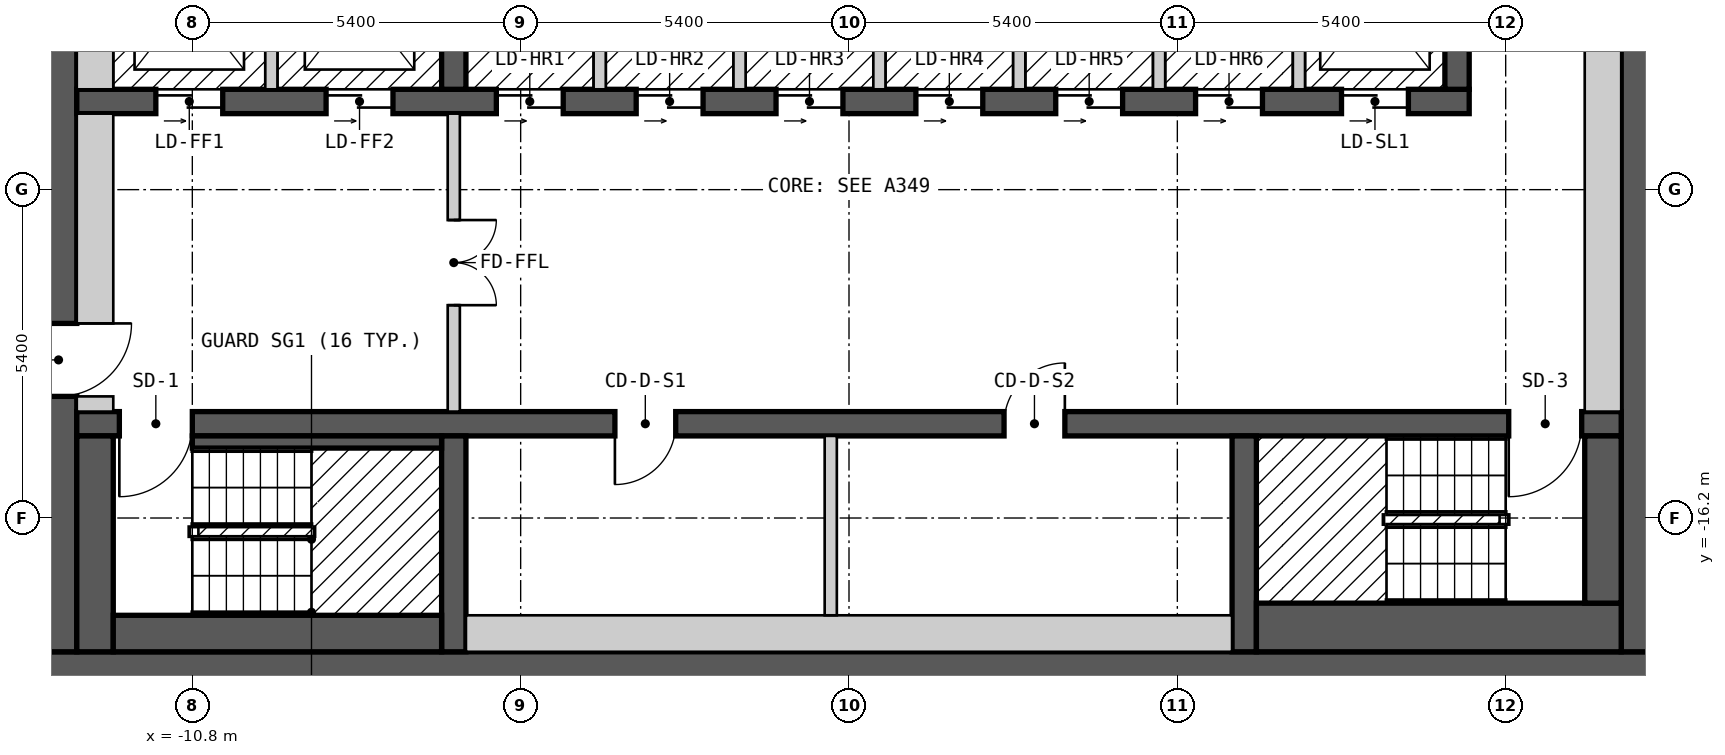
"""IFC4 building model, lengths in metres.
Left out: names, types, materials, properties, quantities, classifications, styles, units other than length and angle.
Written with IfcOpenShell. Run it as: python <this file> out.ifc"""

import sys

from ifc_helpers import new_model, si_unit, direction, frame, frame_2d, origin, place, context, subcontext, project, spatial, rectangle, extrude, element, fill, save


model = new_model("IFC4")
c1 = context("Model", 3, precision=1e-05, world=origin(), true_north=direction((0.0, 1.0)))
c2 = subcontext(c1, "Body", "Model", "MODEL_VIEW")
j1 = project(units=[si_unit("LENGTHUNIT", "METRE"), si_unit("PLANEANGLEUNIT", "RADIAN")], contexts=[c1])
p1 = place(None, origin())
s1 = spatial("IfcSite", under=j1, at=p1, CompositionType="ELEMENT")
p2 = place(p1, origin())
s2 = spatial("IfcBuilding", under=s1, at=p2, CompositionType="ELEMENT")
p3 = place(p2, frame((0.0, 0.0, 181.2)))
s3 = spatial("IfcBuildingStorey", under=s2, at=p3, CompositionType="ELEMENT", Elevation=181.2)
p4 = place(p3, frame((-13.3, -18.7, 0.0), z_axis=(0.0, 0.0, 1.0), x_axis=(1.0, 0.0, 0.0)))
e1 = element("IfcWall", 1, at=p4, inside=s3, PredefinedType="SHEAR", context=c2, shape_type="SweptSolid", body=[
    extrude(rectangle(XDim=26.6, YDim=0.6, at=frame_2d((13.3, 0.0))), origin(), (0.0, 0.0, 1.0), 2.7),
])
p5 = place(p3, frame((-13.0, -18.4, 0.0), z_axis=(0.0, 0.0, 1.0), x_axis=(0.0, 1.0, 0.0)))
e2 = element("IfcWall", 2, at=p5, inside=s3, PredefinedType="SHEAR", context=c2, shape_type="SweptSolid", body=[
    extrude(rectangle(XDim=12.8, YDim=0.6, at=frame_2d((6.4, 0.0))), origin(), (0.0, 0.0, 1.0), 2.7),
])
p6 = place(p5, frame((4.2, 0.0, 0.0)))
e3 = element("IfcOpeningElement", 3, at=p6, cuts=e2, PredefinedType="OPENING", context=c2, shape_type="SweptSolid", body=[
    extrude(rectangle(XDim=1.2, YDim=2.1, at=frame_2d((0.6, 1.05))), frame((0.0, 0.31, 0.0), z_axis=(0.0, -1.0, 0.0), x_axis=(1.0, 0.0, 0.0)), (0.0, 0.0, 1.0), 0.62),
])
p7 = place(p3, frame((13.0, -18.4, 0.0), z_axis=(0.0, 0.0, 1.0), x_axis=(0.0, 1.0, 0.0)))
e4 = element("IfcWall", 4, at=p7, inside=s3, PredefinedType="SHEAR", context=c2, shape_type="SweptSolid", body=[
    extrude(rectangle(XDim=12.8, YDim=0.6, at=frame_2d((6.4, 0.0))), origin(), (0.0, 0.0, 1.0), 2.7),
])
p8 = place(p3, frame((-12.7, -14.65, 0.0), z_axis=(0.0, 0.0, 1.0), x_axis=(1.0, 0.0, 0.0)))
e5 = element("IfcWall", 5, at=p8, inside=s3, PredefinedType="SHEAR", context=c2, shape_type="SweptSolid", body=[
    extrude(rectangle(XDim=25.4, YDim=0.4, at=frame_2d((12.7, 0.0))), origin(), (0.0, 0.0, 1.0), 2.7),
])
p9 = place(p8, frame((1.9, 0.0, 0.0), z_axis=(0.0, 0.0, 1.0), x_axis=(-1.0, 0.0, 0.0)))
e6 = element("IfcOpeningElement", 6, at=p9, cuts=e5, PredefinedType="OPENING", context=c2, shape_type="SweptSolid", body=[
    extrude(rectangle(XDim=1.2, YDim=2.1, at=frame_2d((0.6, 1.05))), frame((0.0, 0.21, 0.0), z_axis=(0.0, -1.0, 0.0), x_axis=(1.0, 0.0, 0.0)), (0.0, 0.0, 1.0), 0.42),
])
p10 = place(p8, frame((24.75, 0.0, 0.0), z_axis=(0.0, 0.0, 1.0), x_axis=(-1.0, 0.0, 0.0)))
e7 = element("IfcOpeningElement", 7, at=p10, cuts=e5, PredefinedType="OPENING", context=c2, shape_type="SweptSolid", body=[
    extrude(rectangle(XDim=1.2, YDim=2.1, at=frame_2d((0.6, 1.05))), frame((0.0, 0.21, 0.0), z_axis=(0.0, -1.0, 0.0), x_axis=(1.0, 0.0, 0.0)), (0.0, 0.0, 1.0), 0.42),
])
p11 = place(p8, frame((9.85, 0.0, 0.0), z_axis=(0.0, 0.0, 1.0), x_axis=(-1.0, 0.0, 0.0)))
e8 = element("IfcOpeningElement", 8, at=p11, cuts=e5, PredefinedType="OPENING", context=c2, shape_type="SweptSolid", body=[
    extrude(rectangle(XDim=1.0, YDim=2.1, at=frame_2d((0.5, 1.05))), frame((0.0, 0.21, 0.0), z_axis=(0.0, -1.0, 0.0), x_axis=(1.0, 0.0, 0.0)), (0.0, 0.0, 1.0), 0.42),
])
p12 = place(p8, frame((16.25, 0.0, 0.0), z_axis=(0.0, 0.0, 1.0), x_axis=(-1.0, 0.0, 0.0)))
e9 = element("IfcOpeningElement", 9, at=p12, cuts=e5, PredefinedType="OPENING", context=c2, shape_type="SweptSolid", body=[
    extrude(rectangle(XDim=1.0, YDim=2.1, at=frame_2d((0.5, 1.05))), frame((0.0, 0.21, 0.0), z_axis=(0.0, -1.0, 0.0), x_axis=(1.0, 0.0, 0.0)), (0.0, 0.0, 1.0), 0.42),
])
p13 = place(p3, frame((-12.7, -9.35, 0.0), z_axis=(0.0, 0.0, 1.0), x_axis=(1.0, 0.0, 0.0)))
e10 = element("IfcWall", 10, at=p13, inside=s3, PredefinedType="SHEAR", context=c2, shape_type="SweptSolid", body=[
    extrude(rectangle(XDim=22.9, YDim=0.4, at=frame_2d((11.45, 0.0))), origin(), (0.0, 0.0, 1.0), 2.7),
])
p14 = place(p13, frame((1.3, 0.0, 0.0)))
e11 = element("IfcOpeningElement", 11, at=p14, cuts=e10, PredefinedType="OPENING", context=c2, shape_type="SweptSolid", body=[
    extrude(rectangle(XDim=1.1, YDim=2.1, at=frame_2d((0.55, 1.05))), frame((0.0, 0.21, 0.0), z_axis=(0.0, -1.0, 0.0), x_axis=(1.0, 0.0, 0.0)), (0.0, 0.0, 1.0), 0.42),
])
p15 = place(p13, frame((4.1, 0.0, 0.0)))
e12 = element("IfcOpeningElement", 12, at=p15, cuts=e10, PredefinedType="OPENING", context=c2, shape_type="SweptSolid", body=[
    extrude(rectangle(XDim=1.1, YDim=2.1, at=frame_2d((0.55, 1.05))), frame((0.0, 0.21, 0.0), z_axis=(0.0, -1.0, 0.0), x_axis=(1.0, 0.0, 0.0)), (0.0, 0.0, 1.0), 0.42),
])
p16 = place(p13, frame((6.9, 0.0, 0.0)))
e13 = element("IfcOpeningElement", 13, at=p16, cuts=e10, PredefinedType="OPENING", context=c2, shape_type="SweptSolid", body=[
    extrude(rectangle(XDim=1.1, YDim=2.1, at=frame_2d((0.55, 1.05))), frame((0.0, 0.21, 0.0), z_axis=(0.0, -1.0, 0.0), x_axis=(1.0, 0.0, 0.0)), (0.0, 0.0, 1.0), 0.42),
])
p17 = place(p13, frame((9.2, 0.0, 0.0)))
e14 = element("IfcOpeningElement", 14, at=p17, cuts=e10, PredefinedType="OPENING", context=c2, shape_type="SweptSolid", body=[
    extrude(rectangle(XDim=1.1, YDim=2.1, at=frame_2d((0.55, 1.05))), frame((0.0, 0.21, 0.0), z_axis=(0.0, -1.0, 0.0), x_axis=(1.0, 0.0, 0.0)), (0.0, 0.0, 1.0), 0.42),
])
p18 = place(p13, frame((11.5, 0.0, 0.0)))
e15 = element("IfcOpeningElement", 15, at=p18, cuts=e10, PredefinedType="OPENING", context=c2, shape_type="SweptSolid", body=[
    extrude(rectangle(XDim=1.1, YDim=2.1, at=frame_2d((0.55, 1.05))), frame((0.0, 0.21, 0.0), z_axis=(0.0, -1.0, 0.0), x_axis=(1.0, 0.0, 0.0)), (0.0, 0.0, 1.0), 0.42),
])
p19 = place(p13, frame((13.8, 0.0, 0.0)))
e16 = element("IfcOpeningElement", 16, at=p19, cuts=e10, PredefinedType="OPENING", context=c2, shape_type="SweptSolid", body=[
    extrude(rectangle(XDim=1.1, YDim=2.1, at=frame_2d((0.55, 1.05))), frame((0.0, 0.21, 0.0), z_axis=(0.0, -1.0, 0.0), x_axis=(1.0, 0.0, 0.0)), (0.0, 0.0, 1.0), 0.42),
])
p20 = place(p13, frame((16.1, 0.0, 0.0)))
e17 = element("IfcOpeningElement", 17, at=p20, cuts=e10, PredefinedType="OPENING", context=c2, shape_type="SweptSolid", body=[
    extrude(rectangle(XDim=1.1, YDim=2.1, at=frame_2d((0.55, 1.05))), frame((0.0, 0.21, 0.0), z_axis=(0.0, -1.0, 0.0), x_axis=(1.0, 0.0, 0.0)), (0.0, 0.0, 1.0), 0.42),
])
p21 = place(p13, frame((18.4, 0.0, 0.0)))
e18 = element("IfcOpeningElement", 18, at=p21, cuts=e10, PredefinedType="OPENING", context=c2, shape_type="SweptSolid", body=[
    extrude(rectangle(XDim=1.1, YDim=2.1, at=frame_2d((0.55, 1.05))), frame((0.0, 0.21, 0.0), z_axis=(0.0, -1.0, 0.0), x_axis=(1.0, 0.0, 0.0)), (0.0, 0.0, 1.0), 0.42),
])
p22 = place(p13, frame((20.8, 0.0, 0.0)))
e19 = element("IfcOpeningElement", 19, at=p22, cuts=e10, PredefinedType="OPENING", context=c2, shape_type="SweptSolid", body=[
    extrude(rectangle(XDim=1.1, YDim=2.1, at=frame_2d((0.55, 1.05))), frame((0.0, 0.21, 0.0), z_axis=(0.0, -1.0, 0.0), x_axis=(1.0, 0.0, 0.0)), (0.0, 0.0, 1.0), 0.42),
])
for number, where, z_axis, x_axis in (
    (20, (-6.5, -18.4, 0.0), (0.0, 0.0, 1.0), (0.0, 1.0, 0.0)),
    (21, (6.5, -18.4, 0.0), (0.0, 0.0, 1.0), (0.0, 1.0, 0.0)),
    (22, (-6.5, -9.15, 0.0), (0.0, 0.0, 1.0), (0.0, 1.0, 0.0)),
    (23, (10.0, -9.15, 0.0), (0.0, 0.0, 1.0), (0.0, 1.0, 0.0)),
):
    element("IfcWall", number, at=place(p3, frame(where, z_axis=z_axis, x_axis=x_axis)), inside=s3, PredefinedType="SHEAR", context=c2, shape_type="SweptSolid", body=[
        extrude(rectangle(XDim=3.55, YDim=0.4, at=frame_2d((1.775, 0.0))), origin(), (0.0, 0.0, 1.0), 2.7),
    ])
p23 = place(p3, frame((-12.4, -18.4, 0.0), z_axis=(0.0, 0.0, 1.0), x_axis=(0.0, 1.0, 0.0)))
e24 = element("IfcWall", 24, at=p23, inside=s3, PredefinedType="SOLIDWALL", context=c2, shape_type="SweptSolid", body=[
    extrude(rectangle(XDim=3.55, YDim=0.6, at=frame_2d((1.775, 0.0))), origin(), (0.0, 0.0, 1.0), 2.7),
])
p24 = place(p3, frame((-12.7, -14.325, 0.0), z_axis=(0.0, 0.0, 1.0), x_axis=(1.0, 0.0, 0.0)))
e25 = element("IfcWall", 25, at=p24, inside=s3, PredefinedType="PARTITIONING", context=c2, shape_type="SweptSolid", body=[
    extrude(rectangle(XDim=0.6, YDim=0.25, at=frame_2d((0.3, 0.0))), origin(), (0.0, 0.0, 1.0), 2.7),
])
p25 = place(p3, frame((-12.4, -13.0, 0.0), z_axis=(0.0, 0.0, 1.0), x_axis=(0.0, 1.0, 0.0)))
e26 = element("IfcWall", 26, at=p25, inside=s3, PredefinedType="PARTITIONING", context=c2, shape_type="SweptSolid", body=[
    extrude(rectangle(XDim=3.45, YDim=0.6, at=frame_2d((1.725, 0.0))), origin(), (0.0, 0.0, 1.0), 2.7),
])
p26 = place(p3, frame((-12.4, -9.15, 0.0), z_axis=(0.0, 0.0, 1.0), x_axis=(0.0, 1.0, 0.0)))
e27 = element("IfcWall", 27, at=p26, inside=s3, PredefinedType="SOLIDWALL", context=c2, shape_type="SweptSolid", body=[
    extrude(rectangle(XDim=3.55, YDim=0.6, at=frame_2d((1.775, 0.0))), origin(), (0.0, 0.0, 1.0), 2.7),
])
p27 = place(p3, frame((-12.1, -18.1, 0.0), z_axis=(0.0, 0.0, 1.0), x_axis=(1.0, 0.0, 0.0)))
e28 = element("IfcWall", 28, at=p27, inside=s3, PredefinedType="SOLIDWALL", context=c2, shape_type="SweptSolid", body=[
    extrude(rectangle(XDim=5.4, YDim=0.6, at=frame_2d((2.7, 0.0))), origin(), (0.0, 0.0, 1.0), 2.7),
])
p28 = place(p3, frame((-10.8, -14.95, 0.0), z_axis=(0.0, 0.0, 1.0), x_axis=(1.0, 0.0, 0.0)))
e29 = element("IfcWall", 29, at=p28, inside=s3, PredefinedType="SOLIDWALL", context=c2, shape_type="SweptSolid", body=[
    extrude(rectangle(XDim=4.1, YDim=0.2, at=frame_2d((2.05, 0.0))), origin(), (0.0, 0.0, 1.0), 2.7),
])
p29 = place(p3, frame((-9.5, -9.15, 0.0), z_axis=(0.0, 0.0, 1.0), x_axis=(0.0, 1.0, 0.0)))
e30 = element("IfcWall", 30, at=p29, inside=s3, PredefinedType="SOLIDWALL", context=c2, shape_type="SweptSolid", body=[
    extrude(rectangle(XDim=2.95, YDim=0.2, at=frame_2d((1.475, 0.0))), origin(), (0.0, 0.0, 1.0), 2.7),
])
p30 = place(p3, frame((-6.5, -14.45, 0.0), z_axis=(0.0, 0.0, 1.0), x_axis=(0.0, 1.0, 0.0)))
e31 = element("IfcWall", 31, at=p30, inside=s3, PredefinedType="PARTITIONING", context=c2, shape_type="SweptSolid", body=[
    extrude(rectangle(XDim=4.9, YDim=0.2, at=frame_2d((2.45, 0.0))), origin(), (0.0, 0.0, 1.0), 2.7),
])
p31 = place(p30, frame((3.15, 0.0, 0.0), z_axis=(0.0, 0.0, 1.0), x_axis=(-1.0, 0.0, 0.0)))
e32 = element("IfcOpeningElement", 32, at=p31, cuts=e31, PredefinedType="OPENING", context=c2, shape_type="SweptSolid", body=[
    extrude(rectangle(XDim=1.4, YDim=2.1, at=frame_2d((0.7, 1.05))), frame((0.0, 0.11, 0.0), z_axis=(0.0, -1.0, 0.0), x_axis=(1.0, 0.0, 0.0)), (0.0, 0.0, 1.0), 0.22),
])
p32 = place(p3, frame((-6.3, -18.1, 0.0), z_axis=(0.0, 0.0, 1.0), x_axis=(1.0, 0.0, 0.0)))
e33 = element("IfcWall", 33, at=p32, inside=s3, PredefinedType="PARTITIONING", context=c2, shape_type="SweptSolid", body=[
    extrude(rectangle(XDim=12.6, YDim=0.6, at=frame_2d((6.3, 0.0))), origin(), (0.0, 0.0, 1.0), 2.7),
])
for number, where, z_axis, x_axis in (
    (34, (-4.1, -9.15, 0.0), (0.0, 0.0, 1.0), (0.0, 1.0, 0.0)),
    (35, (-1.8, -9.15, 0.0), (0.0, 0.0, 1.0), (0.0, 1.0, 0.0)),
):
    element("IfcWall", number, at=place(p3, frame(where, z_axis=z_axis, x_axis=x_axis)), inside=s3, PredefinedType="SOLIDWALL", context=c2, shape_type="SweptSolid", body=[
        extrude(rectangle(XDim=2.95, YDim=0.2, at=frame_2d((1.475, 0.0))), origin(), (0.0, 0.0, 1.0), 2.7),
    ])
p33 = place(p3, frame((-0.3, -17.8, 0.0), z_axis=(0.0, 0.0, 1.0), x_axis=(0.0, 1.0, 0.0)))
e36 = element("IfcWall", 36, at=p33, inside=s3, PredefinedType="PARTITIONING", context=c2, shape_type="SweptSolid", body=[
    extrude(rectangle(XDim=2.95, YDim=0.2, at=frame_2d((1.475, 0.0))), origin(), (0.0, 0.0, 1.0), 2.7),
])
for number, where, z_axis, x_axis in (
    (37, (0.5, -9.15, 0.0), (0.0, 0.0, 1.0), (0.0, 1.0, 0.0)),
    (38, (2.8, -9.15, 0.0), (0.0, 0.0, 1.0), (0.0, 1.0, 0.0)),
    (39, (5.1, -9.15, 0.0), (0.0, 0.0, 1.0), (0.0, 1.0, 0.0)),
):
    element("IfcWall", number, at=place(p3, frame(where, z_axis=z_axis, x_axis=x_axis)), inside=s3, PredefinedType="SOLIDWALL", context=c2, shape_type="SweptSolid", body=[
        extrude(rectangle(XDim=2.95, YDim=0.2, at=frame_2d((1.475, 0.0))), origin(), (0.0, 0.0, 1.0), 2.7),
    ])
p34 = place(p3, frame((6.7, -18.0, 0.0), z_axis=(0.0, 0.0, 1.0), x_axis=(1.0, 0.0, 0.0)))
e40 = element("IfcWall", 40, at=p34, inside=s3, PredefinedType="SOLIDWALL", context=c2, shape_type="SweptSolid", body=[
    extrude(rectangle(XDim=6.0, YDim=0.8, at=frame_2d((3.0, 0.0))), origin(), (0.0, 0.0, 1.0), 2.7),
])
p35 = place(p3, frame((7.4, -9.15, 0.0), z_axis=(0.0, 0.0, 1.0), x_axis=(0.0, 1.0, 0.0)))
e41 = element("IfcWall", 41, at=p35, inside=s3, PredefinedType="SOLIDWALL", context=c2, shape_type="SweptSolid", body=[
    extrude(rectangle(XDim=2.95, YDim=0.2, at=frame_2d((1.475, 0.0))), origin(), (0.0, 0.0, 1.0), 2.7),
])
p36 = place(p3, frame((12.4, -17.6, 0.0), z_axis=(0.0, 0.0, 1.0), x_axis=(0.0, 1.0, 0.0)))
e42 = element("IfcWall", 42, at=p36, inside=s3, PredefinedType="SOLIDWALL", context=c2, shape_type="SweptSolid", body=[
    extrude(rectangle(XDim=2.75, YDim=0.6, at=frame_2d((1.375, 0.0))), origin(), (0.0, 0.0, 1.0), 2.7),
])
p37 = place(p3, frame((12.4, -14.45, 0.0), z_axis=(0.0, 0.0, 1.0), x_axis=(0.0, 1.0, 0.0)))
e43 = element("IfcWall", 43, at=p37, inside=s3, PredefinedType="PARTITIONING", context=c2, shape_type="SweptSolid", body=[
    extrude(rectangle(XDim=8.25, YDim=0.6, at=frame_2d((4.125, 0.0))), origin(), (0.0, 0.0, 1.0), 2.7),
])
p38 = place(p14, origin())
e44 = element("IfcDoor", 44, at=p38, inside=s3, OperationType="DOUBLE_DOOR_SLIDING", PredefinedType="DOOR", context=c2, shape_type="SweptSolid", body=[
    extrude(rectangle(XDim=1.1, YDim=2.1, at=frame_2d((0.55, 1.05))), frame((0.0, 0.025, 0.0), z_axis=(0.0, -1.0, 0.0), x_axis=(1.0, 0.0, 0.0)), (0.0, 0.0, 1.0), 0.05),
])
fill(e11, e44)
p39 = place(p15, origin())
e45 = element("IfcDoor", 45, at=p39, inside=s3, OperationType="DOUBLE_DOOR_SLIDING", PredefinedType="DOOR", context=c2, shape_type="SweptSolid", body=[
    extrude(rectangle(XDim=1.1, YDim=2.1, at=frame_2d((0.55, 1.05))), frame((0.0, 0.025, 0.0), z_axis=(0.0, -1.0, 0.0), x_axis=(1.0, 0.0, 0.0)), (0.0, 0.0, 1.0), 0.05),
])
fill(e12, e45)
p40 = place(p16, origin())
e46 = element("IfcDoor", 46, at=p40, inside=s3, OperationType="DOUBLE_DOOR_SLIDING", PredefinedType="DOOR", context=c2, shape_type="SweptSolid", body=[
    extrude(rectangle(XDim=1.1, YDim=2.1, at=frame_2d((0.55, 1.05))), frame((0.0, 0.025, 0.0), z_axis=(0.0, -1.0, 0.0), x_axis=(1.0, 0.0, 0.0)), (0.0, 0.0, 1.0), 0.05),
])
fill(e13, e46)
p41 = place(p17, origin())
e47 = element("IfcDoor", 47, at=p41, inside=s3, OperationType="DOUBLE_DOOR_SLIDING", PredefinedType="DOOR", context=c2, shape_type="SweptSolid", body=[
    extrude(rectangle(XDim=1.1, YDim=2.1, at=frame_2d((0.55, 1.05))), frame((0.0, 0.025, 0.0), z_axis=(0.0, -1.0, 0.0), x_axis=(1.0, 0.0, 0.0)), (0.0, 0.0, 1.0), 0.05),
])
fill(e14, e47)
p42 = place(p18, origin())
e48 = element("IfcDoor", 48, at=p42, inside=s3, OperationType="DOUBLE_DOOR_SLIDING", PredefinedType="DOOR", context=c2, shape_type="SweptSolid", body=[
    extrude(rectangle(XDim=1.1, YDim=2.1, at=frame_2d((0.55, 1.05))), frame((0.0, 0.025, 0.0), z_axis=(0.0, -1.0, 0.0), x_axis=(1.0, 0.0, 0.0)), (0.0, 0.0, 1.0), 0.05),
])
fill(e15, e48)
p43 = place(p19, origin())
e49 = element("IfcDoor", 49, at=p43, inside=s3, OperationType="DOUBLE_DOOR_SLIDING", PredefinedType="DOOR", context=c2, shape_type="SweptSolid", body=[
    extrude(rectangle(XDim=1.1, YDim=2.1, at=frame_2d((0.55, 1.05))), frame((0.0, 0.025, 0.0), z_axis=(0.0, -1.0, 0.0), x_axis=(1.0, 0.0, 0.0)), (0.0, 0.0, 1.0), 0.05),
])
fill(e16, e49)
p44 = place(p20, origin())
e50 = element("IfcDoor", 50, at=p44, inside=s3, OperationType="DOUBLE_DOOR_SLIDING", PredefinedType="DOOR", context=c2, shape_type="SweptSolid", body=[
    extrude(rectangle(XDim=1.1, YDim=2.1, at=frame_2d((0.55, 1.05))), frame((0.0, 0.025, 0.0), z_axis=(0.0, -1.0, 0.0), x_axis=(1.0, 0.0, 0.0)), (0.0, 0.0, 1.0), 0.05),
])
fill(e17, e50)
p45 = place(p21, origin())
e51 = element("IfcDoor", 51, at=p45, inside=s3, OperationType="DOUBLE_DOOR_SLIDING", PredefinedType="DOOR", context=c2, shape_type="SweptSolid", body=[
    extrude(rectangle(XDim=1.1, YDim=2.1, at=frame_2d((0.55, 1.05))), frame((0.0, 0.025, 0.0), z_axis=(0.0, -1.0, 0.0), x_axis=(1.0, 0.0, 0.0)), (0.0, 0.0, 1.0), 0.05),
])
fill(e18, e51)
p46 = place(p22, origin())
e52 = element("IfcDoor", 52, at=p46, inside=s3, OperationType="DOUBLE_DOOR_SLIDING", PredefinedType="DOOR", context=c2, shape_type="SweptSolid", body=[
    extrude(rectangle(XDim=1.1, YDim=2.1, at=frame_2d((0.55, 1.05))), frame((0.0, 0.025, 0.0), z_axis=(0.0, -1.0, 0.0), x_axis=(1.0, 0.0, 0.0)), (0.0, 0.0, 1.0), 0.05),
])
fill(e19, e52)
p47 = place(p9, origin())
e53 = element("IfcDoor", 53, at=p47, inside=s3, OperationType="SINGLE_SWING_RIGHT", PredefinedType="DOOR", context=c2, shape_type="SweptSolid", body=[
    extrude(rectangle(XDim=1.2, YDim=2.1, at=frame_2d((0.6, 1.05))), frame((0.0, 0.025, 0.0), z_axis=(0.0, -1.0, 0.0), x_axis=(1.0, 0.0, 0.0)), (0.0, 0.0, 1.0), 0.05),
])
fill(e6, e53)
p48 = place(p10, origin())
e54 = element("IfcDoor", 54, at=p48, inside=s3, OperationType="SINGLE_SWING_RIGHT", PredefinedType="DOOR", context=c2, shape_type="SweptSolid", body=[
    extrude(rectangle(XDim=1.2, YDim=2.1, at=frame_2d((0.6, 1.05))), frame((0.0, 0.025, 0.0), z_axis=(0.0, -1.0, 0.0), x_axis=(1.0, 0.0, 0.0)), (0.0, 0.0, 1.0), 0.05),
])
fill(e7, e54)
p49 = place(p6, origin())
e55 = element("IfcDoor", 55, at=p49, inside=s3, OperationType="SINGLE_SWING_RIGHT", PredefinedType="DOOR", context=c2, shape_type="SweptSolid", body=[
    extrude(rectangle(XDim=1.2, YDim=2.1, at=frame_2d((0.6, 1.05))), frame((0.0, 0.025, 0.0), z_axis=(0.0, -1.0, 0.0), x_axis=(1.0, 0.0, 0.0)), (0.0, 0.0, 1.0), 0.05),
])
fill(e3, e55)
p50 = place(p31, origin())
e56 = element("IfcDoor", 56, at=p50, inside=s3, OperationType="DOUBLE_DOOR_SINGLE_SWING", PredefinedType="DOOR", context=c2, shape_type="SweptSolid", body=[
    extrude(rectangle(XDim=1.4, YDim=2.1, at=frame_2d((0.7, 1.05))), frame((0.0, 0.025, 0.0), z_axis=(0.0, -1.0, 0.0), x_axis=(1.0, 0.0, 0.0)), (0.0, 0.0, 1.0), 0.05),
])
fill(e32, e56)
p51 = place(p11, origin())
e57 = element("IfcDoor", 57, at=p51, inside=s3, OperationType="SINGLE_SWING_RIGHT", PredefinedType="DOOR", context=c2, shape_type="SweptSolid", body=[
    extrude(rectangle(XDim=1.0, YDim=2.1, at=frame_2d((0.5, 1.05))), frame((0.0, 0.025, 0.0), z_axis=(0.0, -1.0, 0.0), x_axis=(1.0, 0.0, 0.0)), (0.0, 0.0, 1.0), 0.05),
])
fill(e8, e57)
p52 = place(p12, origin())
e58 = element("IfcDoor", 58, at=p52, inside=s3, OperationType="SINGLE_SWING_LEFT", PredefinedType="DOOR", context=c2, shape_type="SweptSolid", body=[
    extrude(rectangle(XDim=1.0, YDim=2.1, at=frame_2d((0.5, 1.05))), frame((0.0, 0.025, 0.0), z_axis=(0.0, -1.0, 0.0), x_axis=(1.0, 0.0, 0.0)), (0.0, 0.0, 1.0), 0.05),
])
fill(e9, e58)
save(model, sys.argv[1])
